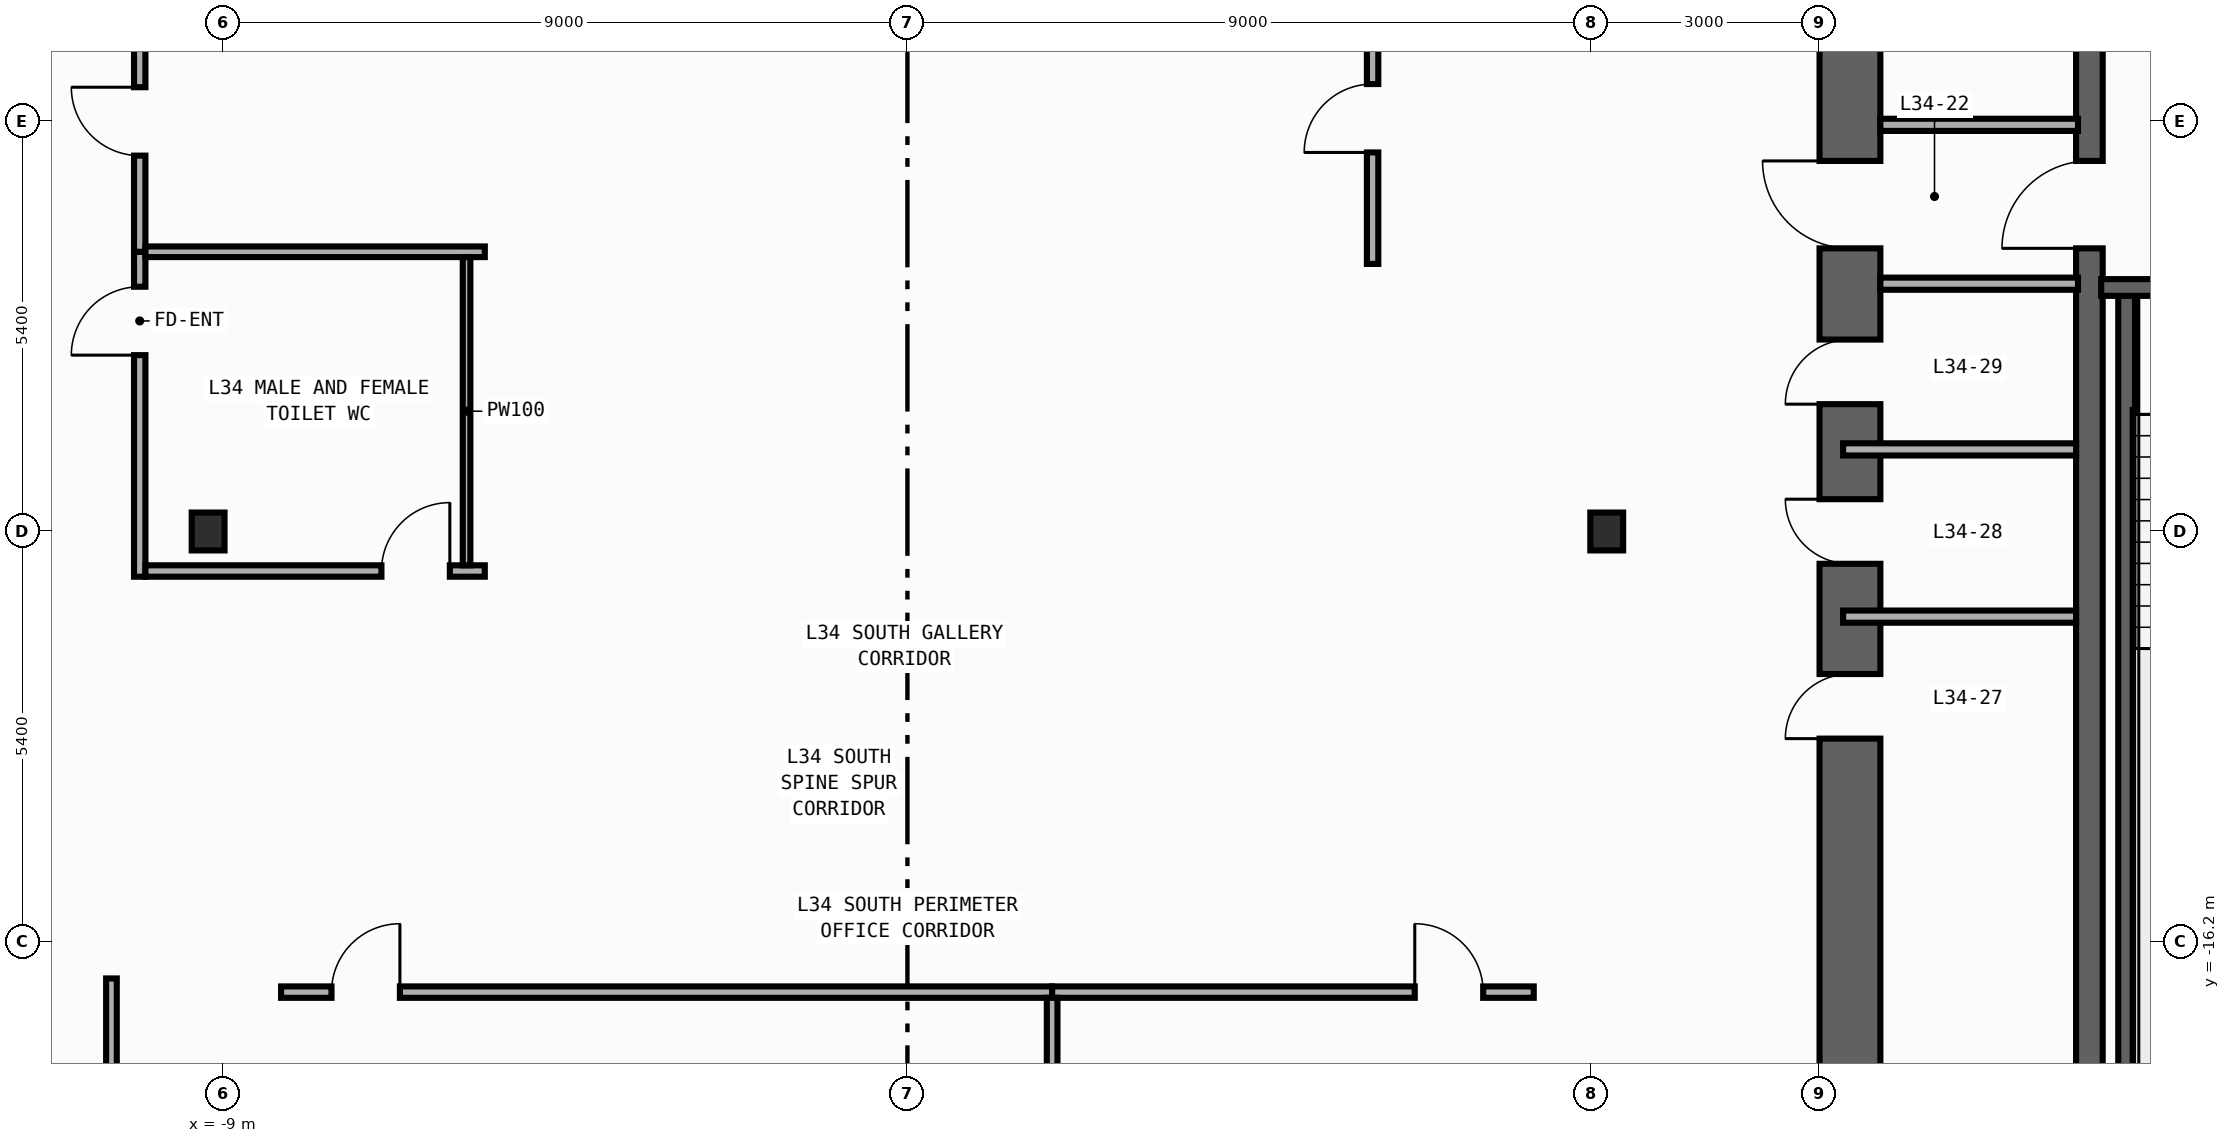
"""IFC4 building model, lengths in metres.
Left out: names, types, materials, properties, quantities, classifications, styles, units other than length and angle.
Written with IfcOpenShell. Run it as: python <this file> out.ifc"""

import sys

from ifc_helpers import new_model, si_unit, direction, frame, frame_2d, origin, origin_2d, place, context, subcontext, project, spatial, rectangle, i_section, extrude, element, fill, save


model = new_model("IFC4")
c1 = context("Model", 3, precision=1e-05, world=origin(), true_north=direction((0.0, 1.0)))
c2 = subcontext(c1, "Body", "Model", "MODEL_VIEW")
j1 = project(units=[si_unit("LENGTHUNIT", "METRE"), si_unit("PLANEANGLEUNIT", "RADIAN")], contexts=[c1])
p1 = place(None, origin())
s1 = spatial("IfcSite", under=j1, at=p1, CompositionType="ELEMENT")
p2 = place(p1, origin())
s2 = spatial("IfcBuilding", under=s1, at=p2, CompositionType="ELEMENT")
p3 = place(p2, frame((0.0, 0.0, 147.8)))
s3 = spatial("IfcBuildingStorey", under=s2, at=p3, CompositionType="ELEMENT", Elevation=147.8)
p4 = place(p3, frame((12.4, -19.8, 0.0), z_axis=(0.0, 0.0, 1.0), x_axis=(0.0, 1.0, 0.0)))
e1 = element("IfcWall", 1, at=p4, inside=s3, PredefinedType="SHEAR", context=c2, shape_type="SweptSolid", body=[
    extrude(rectangle(XDim=27.0, YDim=0.8, at=frame_2d((13.5, 0.0))), origin(), (0.0, 0.0, 1.0), 3.85),
])
p5 = place(p4, frame((23.05, 0.0, 0.0)))
e2 = element("IfcOpeningElement", 2, at=p5, cuts=e1, PredefinedType="OPENING", context=c2, shape_type="SweptSolid", body=[
    extrude(rectangle(XDim=1.1, YDim=2.2, at=frame_2d((0.55, 1.1))), frame((0.0, 0.41, 0.0), z_axis=(0.0, -1.0, 0.0), x_axis=(1.0, 0.0, 0.0)), (0.0, 0.0, 1.0), 0.82),
])
p6 = place(p4, frame((19.85, 0.0, 0.0)))
e3 = element("IfcOpeningElement", 3, at=p6, cuts=e1, PredefinedType="OPENING", context=c2, shape_type="SweptSolid", body=[
    extrude(rectangle(XDim=1.1, YDim=2.2, at=frame_2d((0.55, 1.1))), frame((0.0, 0.41, 0.0), z_axis=(0.0, -1.0, 0.0), x_axis=(1.0, 0.0, 0.0)), (0.0, 0.0, 1.0), 0.82),
])
p7 = place(p4, frame((16.65, 0.0, 0.0)))
e4 = element("IfcOpeningElement", 4, at=p7, cuts=e1, PredefinedType="OPENING", context=c2, shape_type="SweptSolid", body=[
    extrude(rectangle(XDim=1.1, YDim=2.2, at=frame_2d((0.55, 1.1))), frame((0.0, 0.41, 0.0), z_axis=(0.0, -1.0, 0.0), x_axis=(1.0, 0.0, 0.0)), (0.0, 0.0, 1.0), 0.82),
])
p8 = place(p4, frame((6.275, 0.0, 0.0)))
e5 = element("IfcOpeningElement", 5, at=p8, cuts=e1, PredefinedType="OPENING", context=c2, shape_type="SweptSolid", body=[
    extrude(rectangle(XDim=0.85, YDim=2.1, at=frame_2d((0.425, 1.05))), frame((0.0, 0.41, 0.0), z_axis=(0.0, -1.0, 0.0), x_axis=(1.0, 0.0, 0.0)), (0.0, 0.0, 1.0), 0.82),
])
p9 = place(p4, frame((8.575, 0.0, 0.0)))
e6 = element("IfcOpeningElement", 6, at=p9, cuts=e1, PredefinedType="OPENING", context=c2, shape_type="SweptSolid", body=[
    extrude(rectangle(XDim=0.85, YDim=2.1, at=frame_2d((0.425, 1.05))), frame((0.0, 0.41, 0.0), z_axis=(0.0, -1.0, 0.0), x_axis=(1.0, 0.0, 0.0)), (0.0, 0.0, 1.0), 0.82),
])
p10 = place(p4, frame((10.675, 0.0, 0.0)))
e7 = element("IfcOpeningElement", 7, at=p10, cuts=e1, PredefinedType="OPENING", context=c2, shape_type="SweptSolid", body=[
    extrude(rectangle(XDim=0.85, YDim=2.1, at=frame_2d((0.425, 1.05))), frame((0.0, 0.41, 0.0), z_axis=(0.0, -1.0, 0.0), x_axis=(1.0, 0.0, 0.0)), (0.0, 0.0, 1.0), 0.82),
])
p11 = place(p4, frame((12.725, 0.0, 0.0)))
e8 = element("IfcOpeningElement", 8, at=p11, cuts=e1, PredefinedType="OPENING", context=c2, shape_type="SweptSolid", body=[
    extrude(rectangle(XDim=1.15, YDim=2.2, at=frame_2d((0.575, 1.1))), frame((0.0, 0.41, 0.0), z_axis=(0.0, -1.0, 0.0), x_axis=(1.0, 0.0, 0.0)), (0.0, 0.0, 1.0), 0.82),
])
p12 = place(p4, frame((25.125, 0.0, 0.0)))
e9 = element("IfcOpeningElement", 9, at=p12, cuts=e1, PredefinedType="OPENING", context=c2, shape_type="SweptSolid", body=[
    extrude(rectangle(XDim=0.85, YDim=2.1, at=frame_2d((0.425, 1.05))), frame((0.0, 0.41, 0.0), z_axis=(0.0, -1.0, 0.0), x_axis=(1.0, 0.0, 0.0)), (0.0, 0.0, 1.0), 0.82),
])
p13 = place(p3, frame((15.55, -19.0, 0.0), z_axis=(0.0, 0.0, 1.0), x_axis=(0.0, 1.0, 0.0)))
e10 = element("IfcWall", 10, at=p13, inside=s3, PredefinedType="SHEAR", context=c2, shape_type="SweptSolid", body=[
    extrude(rectangle(XDim=25.4, YDim=0.35, at=frame_2d((12.7, 0.0))), origin(), (0.0, 0.0, 1.0), 3.85),
])
p14 = place(p13, frame((11.925, 0.0, 0.0)))
e11 = element("IfcOpeningElement", 11, at=p14, cuts=e10, PredefinedType="OPENING", context=c2, shape_type="SweptSolid", body=[
    extrude(rectangle(XDim=1.15, YDim=2.2, at=frame_2d((0.575, 1.1))), frame((0.0, 0.185, 0.0), z_axis=(0.0, -1.0, 0.0), x_axis=(1.0, 0.0, 0.0)), (0.0, 0.0, 1.0), 0.37),
])
p15 = place(p13, frame((24.325, 0.0, 0.0)))
e12 = element("IfcOpeningElement", 12, at=p15, cuts=e10, PredefinedType="OPENING", context=c2, shape_type="SweptSolid", body=[
    extrude(rectangle(XDim=0.85, YDim=2.1, at=frame_2d((0.425, 1.05))), frame((0.0, 0.185, 0.0), z_axis=(0.0, -1.0, 0.0), x_axis=(1.0, 0.0, 0.0)), (0.0, 0.0, 1.0), 0.37),
])
p16 = place(p3, frame((16.04, -18.89, 0.0), z_axis=(0.0, 0.0, 1.0), x_axis=(0.0, 1.0, 0.0)))
e13 = element("IfcWall", 13, at=p16, inside=s3, PredefinedType="SHEAR", context=c2, shape_type="SweptSolid", body=[
    extrude(rectangle(XDim=11.3, YDim=0.22, at=frame_2d((5.65, 0.0))), origin(), (0.0, 0.0, 1.0), 3.85),
])
p17 = place(p3, frame((19.62, -7.59, 0.0), z_axis=(0.0, 0.0, 1.0), x_axis=(-1.0, 0.0, 0.0)))
e14 = element("IfcWall", 14, at=p17, inside=s3, PredefinedType="SHEAR", context=c2, shape_type="SweptSolid", body=[
    extrude(rectangle(XDim=3.915, YDim=0.22, at=frame_2d((1.958, 0.0))), origin(), (0.0, 0.0, 1.0), 3.85),
])
p18 = place(p17, frame((1.08, 0.0, 0.0)))
e15 = element("IfcOpeningElement", 15, at=p18, cuts=e14, PredefinedType="OPENING", context=c2, shape_type="SweptSolid", body=[
    extrude(rectangle(XDim=1.1, YDim=2.2, at=frame_2d((0.55, 1.1))), frame((0.0, 0.12, 0.0), z_axis=(0.0, -1.0, 0.0), x_axis=(1.0, 0.0, 0.0)), (0.0, 0.0, 1.0), 0.24),
])
for number, where, z_axis, x_axis in (
    (16, (-9.2, -10.8, 0.0), (0.0, 0.0, 1.0), (1.0, 0.0, 0.0)),
    (17, (9.2, -10.8, 0.0), (0.0, 0.0, 1.0), (1.0, 0.0, 0.0)),
):
    element("IfcColumn", number, at=place(p3, frame(where, z_axis=z_axis, x_axis=x_axis)), inside=s3, PredefinedType="COLUMN", context=c2, shape_type="SweptSolid", body=[
        extrude(i_section(OverallWidth=0.432, OverallDepth=0.498, WebThickness=0.045, FlangeThickness=0.07, FilletRadius=0.022, at=origin_2d()), origin(), (0.0, 0.0, 1.0), 4.2),
    ])
for number, where, z_axis, x_axis in (
    (18, (12.8, -5.45, 0.0), (0.0, 0.0, 1.0), (1.0, 0.0, 0.0)),
    (19, (12.8, -7.54, 0.0), (0.0, 0.0, 1.0), (1.0, 0.0, 0.0)),
):
    element("IfcWall", number, at=place(p3, frame(where, z_axis=z_axis, x_axis=x_axis)), inside=s3, PredefinedType="STANDARD", context=c2, shape_type="SweptSolid", body=[
        extrude(rectangle(XDim=2.6, YDim=0.16, at=frame_2d((1.3, 0.0))), origin(), (0.0, 0.0, 1.0), 3.85),
    ])
for number, where, z_axis, x_axis in (
    (20, (12.31, -11.92, 0.0), (0.0, 0.0, 1.0), (1.0, 0.0, 0.0)),
    (21, (12.31, -9.72, 0.0), (0.0, 0.0, 1.0), (1.0, 0.0, 0.0)),
):
    element("IfcWall", number, at=place(p3, frame(where, z_axis=z_axis, x_axis=x_axis)), inside=s3, PredefinedType="PARTITIONING", context=c2, shape_type="SweptSolid", body=[
        extrude(rectangle(XDim=3.065, YDim=0.16, at=frame_2d((1.532, 0.0))), origin(), (0.0, 0.0, 1.0), 3.85),
    ])
p19 = place(p3, frame((-10.1, -11.395, 0.0), z_axis=(0.0, 0.0, 1.0), x_axis=(0.0, 1.0, 0.0)))
e22 = element("IfcWall", 22, at=p19, inside=s3, PredefinedType="PARTITIONING", context=c2, shape_type="SweptSolid", body=[
    extrude(rectangle(XDim=4.275, YDim=0.15, at=frame_2d((2.137, 0.0))), origin(), (0.0, 0.0, 1.0), 3.85),
])
p20 = place(p19, frame((2.915, 0.0, 0.0)))
e23 = element("IfcOpeningElement", 23, at=p20, cuts=e22, PredefinedType="OPENING", context=c2, shape_type="SweptSolid", body=[
    extrude(rectangle(XDim=0.9, YDim=2.15, at=frame_2d((0.45, 1.075))), frame((0.0, 0.085, 0.0), z_axis=(0.0, -1.0, 0.0), x_axis=(1.0, 0.0, 0.0)), (0.0, 0.0, 1.0), 0.17),
])
p21 = place(p3, frame((-10.1, -7.12, 0.0), z_axis=(0.0, 0.0, 1.0), x_axis=(0.0, 1.0, 0.0)))
e24 = element("IfcWall", 24, at=p21, inside=s3, PredefinedType="PARTITIONING", context=c2, shape_type="SweptSolid", body=[
    extrude(rectangle(XDim=17.915, YDim=0.15, at=frame_2d((8.958, 0.0))), origin(), (0.0, 0.0, 1.0), 3.85),
])
p22 = place(p21, frame((1.265, 0.0, 0.0)))
e25 = element("IfcOpeningElement", 25, at=p22, cuts=e24, PredefinedType="OPENING", context=c2, shape_type="SweptSolid", body=[
    extrude(rectangle(XDim=0.9, YDim=2.15, at=frame_2d((0.45, 1.075))), frame((0.0, 0.085, 0.0), z_axis=(0.0, -1.0, 0.0), x_axis=(1.0, 0.0, 0.0)), (0.0, 0.0, 1.0), 0.17),
])
p23 = place(p3, frame((-10.025, -11.32, 0.0), z_axis=(0.0, 0.0, 1.0), x_axis=(1.0, 0.0, 0.0)))
e26 = element("IfcWall", 26, at=p23, inside=s3, PredefinedType="PARTITIONING", context=c2, shape_type="SweptSolid", body=[
    extrude(rectangle(XDim=4.465, YDim=0.15, at=frame_2d((2.232, 0.0))), origin(), (0.0, 0.0, 1.0), 3.85),
])
p24 = place(p23, frame((3.105, 0.0, 0.0)))
e27 = element("IfcOpeningElement", 27, at=p24, cuts=e26, PredefinedType="OPENING", context=c2, shape_type="SweptSolid", body=[
    extrude(rectangle(XDim=0.9, YDim=2.15, at=frame_2d((0.45, 1.075))), frame((0.0, 0.085, 0.0), z_axis=(0.0, -1.0, 0.0), x_axis=(1.0, 0.0, 0.0)), (0.0, 0.0, 1.0), 0.17),
])
p25 = place(p3, frame((6.12, -7.28, 0.0), z_axis=(0.0, 0.0, 1.0), x_axis=(0.0, 1.0, 0.0)))
e28 = element("IfcWall", 28, at=p25, inside=s3, PredefinedType="PARTITIONING", context=c2, shape_type="SweptSolid", body=[
    extrude(rectangle(XDim=17.925, YDim=0.15, at=frame_2d((8.962, 0.0))), origin(), (0.0, 0.0, 1.0), 3.85),
])
p26 = place(p25, frame((1.467, 0.0, 0.0)))
e29 = element("IfcOpeningElement", 29, at=p26, cuts=e28, PredefinedType="OPENING", context=c2, shape_type="SweptSolid", body=[
    extrude(rectangle(XDim=0.9, YDim=2.15, at=frame_2d((0.45, 1.075))), frame((0.0, 0.085, 0.0), z_axis=(0.0, -1.0, 0.0), x_axis=(1.0, 0.0, 0.0)), (0.0, 0.0, 1.0), 0.17),
])
p27 = place(p3, frame((-8.24, -16.86, 0.0), z_axis=(0.0, 0.0, 1.0), x_axis=(1.0, 0.0, 0.0)))
e30 = element("IfcWall", 30, at=p27, inside=s3, PredefinedType="PARTITIONING", context=c2, shape_type="SweptSolid", body=[
    extrude(rectangle(XDim=10.144, YDim=0.15, at=frame_2d((5.072, 0.0))), origin(), (0.0, 0.0, 1.0), 3.85),
])
p28 = place(p27, frame((0.663, 0.0, 0.0)))
e31 = element("IfcOpeningElement", 31, at=p28, cuts=e30, PredefinedType="OPENING", context=c2, shape_type="SweptSolid", body=[
    extrude(rectangle(XDim=0.9, YDim=2.15, at=frame_2d((0.45, 1.075))), frame((0.0, 0.085, 0.0), z_axis=(0.0, -1.0, 0.0), x_axis=(1.0, 0.0, 0.0)), (0.0, 0.0, 1.0), 0.17),
])
p29 = place(p3, frame((1.904, -16.86, 0.0), z_axis=(0.0, 0.0, 1.0), x_axis=(1.0, 0.0, 0.0)))
e32 = element("IfcWall", 32, at=p29, inside=s3, PredefinedType="PARTITIONING", context=c2, shape_type="SweptSolid", body=[
    extrude(rectangle(XDim=6.336, YDim=0.15, at=frame_2d((3.168, 0.0))), origin(), (0.0, 0.0, 1.0), 3.85),
])
p30 = place(p29, frame((4.771, 0.0, 0.0)))
e33 = element("IfcOpeningElement", 33, at=p30, cuts=e32, PredefinedType="OPENING", context=c2, shape_type="SweptSolid", body=[
    extrude(rectangle(XDim=0.9, YDim=2.15, at=frame_2d((0.45, 1.075))), frame((0.0, 0.085, 0.0), z_axis=(0.0, -1.0, 0.0), x_axis=(1.0, 0.0, 0.0)), (0.0, 0.0, 1.0), 0.17),
])
p31 = place(p3, frame((-10.472, -26.118, 0.0), z_axis=(0.0, 0.0, 1.0), x_axis=(0.0, 1.0, 0.0)))
e34 = element("IfcWall", 34, at=p31, inside=s3, PredefinedType="PARTITIONING", context=c2, shape_type="SweptSolid", body=[
    extrude(rectangle(XDim=9.438, YDim=0.14, at=frame_2d((4.719, 0.0))), origin(), (0.0, 0.0, 1.0), 3.85),
])
p32 = place(p31, frame((3.083, 0.0, 0.0)))
e35 = element("IfcOpeningElement", 35, at=p32, cuts=e34, PredefinedType="OPENING", context=c2, shape_type="SweptSolid", body=[
    extrude(rectangle(XDim=0.85, YDim=2.1, at=frame_2d((0.425, 1.05))), frame((0.0, 0.08, 0.0), z_axis=(0.0, -1.0, 0.0), x_axis=(1.0, 0.0, 0.0)), (0.0, 0.0, 1.0), 0.16),
])
p33 = place(p3, frame((1.904, -26.057, 0.0), z_axis=(0.0, 0.0, 1.0), x_axis=(0.0, 1.0, 0.0)))
e36 = element("IfcWall", 36, at=p33, inside=s3, PredefinedType="PARTITIONING", context=c2, shape_type="SweptSolid", body=[
    extrude(rectangle(XDim=9.122, YDim=0.14, at=frame_2d((4.561, 0.0))), origin(), (0.0, 0.0, 1.0), 3.85),
])
p34 = place(p3, frame((-10.025, -7.12, 0.0), z_axis=(0.0, 0.0, 1.0), x_axis=(1.0, 0.0, 0.0)))
e37 = element("IfcWall", 37, at=p34, inside=s3, PredefinedType="PARTITIONING", context=c2, shape_type="SweptSolid", body=[
    extrude(rectangle(XDim=4.465, YDim=0.14, at=frame_2d((2.232, 0.0))), origin(), (0.0, 0.0, 1.0), 3.85),
])
p35 = place(p3, frame((-5.8, -7.19, 0.0), z_axis=(0.0, 0.0, 1.0), x_axis=(0.0, -1.0, 0.0)))
e38 = element("IfcWall", 38, at=p35, inside=s3, PredefinedType="PARTITIONING", context=c2, shape_type="SweptSolid", body=[
    extrude(rectangle(XDim=4.055, YDim=0.1, at=frame_2d((2.028, 0.0))), origin(), (0.0, 0.0, 1.0), 3.85),
])
p36 = place(p8, origin())
e39 = element("IfcDoor", 39, at=p36, inside=s3, OperationType="SINGLE_SWING_LEFT", PredefinedType="DOOR", context=c2, shape_type="SweptSolid", body=[
    extrude(rectangle(XDim=0.85, YDim=2.1, at=frame_2d((0.425, 1.05))), frame((0.0, 0.025, 0.0), z_axis=(0.0, -1.0, 0.0), x_axis=(1.0, 0.0, 0.0)), (0.0, 0.0, 1.0), 0.05),
])
fill(e5, e39)
p37 = place(p9, origin())
e40 = element("IfcDoor", 40, at=p37, inside=s3, OperationType="SINGLE_SWING_RIGHT", PredefinedType="DOOR", context=c2, shape_type="SweptSolid", body=[
    extrude(rectangle(XDim=0.85, YDim=2.1, at=frame_2d((0.425, 1.05))), frame((0.0, 0.025, 0.0), z_axis=(0.0, -1.0, 0.0), x_axis=(1.0, 0.0, 0.0)), (0.0, 0.0, 1.0), 0.05),
])
fill(e6, e40)
p38 = place(p10, origin())
e41 = element("IfcDoor", 41, at=p38, inside=s3, OperationType="SINGLE_SWING_LEFT", PredefinedType="DOOR", context=c2, shape_type="SweptSolid", body=[
    extrude(rectangle(XDim=0.85, YDim=2.1, at=frame_2d((0.425, 1.05))), frame((0.0, 0.025, 0.0), z_axis=(0.0, -1.0, 0.0), x_axis=(1.0, 0.0, 0.0)), (0.0, 0.0, 1.0), 0.05),
])
fill(e7, e41)
p39 = place(p11, origin())
e42 = element("IfcDoor", 42, at=p39, inside=s3, OperationType="SINGLE_SWING_RIGHT", PredefinedType="DOOR", context=c2, shape_type="SweptSolid", body=[
    extrude(rectangle(XDim=1.15, YDim=2.2, at=frame_2d((0.575, 1.1))), frame((0.0, 0.025, 0.0), z_axis=(0.0, -1.0, 0.0), x_axis=(1.0, 0.0, 0.0)), (0.0, 0.0, 1.0), 0.05),
])
fill(e8, e42)
p40 = place(p14, origin())
e43 = element("IfcDoor", 43, at=p40, inside=s3, OperationType="SINGLE_SWING_LEFT", PredefinedType="DOOR", context=c2, shape_type="SweptSolid", body=[
    extrude(rectangle(XDim=1.15, YDim=2.2, at=frame_2d((0.575, 1.1))), frame((0.0, 0.025, 0.0), z_axis=(0.0, -1.0, 0.0), x_axis=(1.0, 0.0, 0.0)), (0.0, 0.0, 1.0), 0.05),
])
fill(e11, e43)
p41 = place(p20, origin())
e44 = element("IfcDoor", 44, at=p41, inside=s3, OperationType="SINGLE_SWING_LEFT", PredefinedType="DOOR", context=c2, shape_type="SweptSolid", body=[
    extrude(rectangle(XDim=0.9, YDim=2.15, at=frame_2d((0.45, 1.075))), frame((0.0, 0.025, 0.0), z_axis=(0.0, -1.0, 0.0), x_axis=(1.0, 0.0, 0.0)), (0.0, 0.0, 1.0), 0.05),
])
fill(e23, e44)
p42 = place(p22, origin())
e45 = element("IfcDoor", 45, at=p42, inside=s3, OperationType="SINGLE_SWING_RIGHT", PredefinedType="DOOR", context=c2, shape_type="SweptSolid", body=[
    extrude(rectangle(XDim=0.9, YDim=2.15, at=frame_2d((0.45, 1.075))), frame((0.0, 0.025, 0.0), z_axis=(0.0, -1.0, 0.0), x_axis=(1.0, 0.0, 0.0)), (0.0, 0.0, 1.0), 0.05),
])
fill(e25, e45)
p43 = place(p24, origin())
e46 = element("IfcDoor", 46, at=p43, inside=s3, OperationType="SINGLE_SWING_RIGHT", PredefinedType="DOOR", context=c2, shape_type="SweptSolid", body=[
    extrude(rectangle(XDim=0.9, YDim=2.15, at=frame_2d((0.45, 1.075))), frame((0.0, 0.025, 0.0), z_axis=(0.0, -1.0, 0.0), x_axis=(1.0, 0.0, 0.0)), (0.0, 0.0, 1.0), 0.05),
])
fill(e27, e46)
p44 = place(p26, origin())
e47 = element("IfcDoor", 47, at=p44, inside=s3, OperationType="SINGLE_SWING_LEFT", PredefinedType="DOOR", context=c2, shape_type="SweptSolid", body=[
    extrude(rectangle(XDim=0.9, YDim=2.15, at=frame_2d((0.45, 1.075))), frame((0.0, 0.025, 0.0), z_axis=(0.0, -1.0, 0.0), x_axis=(1.0, 0.0, 0.0)), (0.0, 0.0, 1.0), 0.05),
])
fill(e29, e47)
p45 = place(p28, origin())
e48 = element("IfcDoor", 48, at=p45, inside=s3, OperationType="SINGLE_SWING_RIGHT", PredefinedType="DOOR", context=c2, shape_type="SweptSolid", body=[
    extrude(rectangle(XDim=0.9, YDim=2.15, at=frame_2d((0.45, 1.075))), frame((0.0, 0.025, 0.0), z_axis=(0.0, -1.0, 0.0), x_axis=(1.0, 0.0, 0.0)), (0.0, 0.0, 1.0), 0.05),
])
fill(e31, e48)
p46 = place(p30, origin())
e49 = element("IfcDoor", 49, at=p46, inside=s3, OperationType="SINGLE_SWING_LEFT", PredefinedType="DOOR", context=c2, shape_type="SweptSolid", body=[
    extrude(rectangle(XDim=0.9, YDim=2.15, at=frame_2d((0.45, 1.075))), frame((0.0, 0.025, 0.0), z_axis=(0.0, -1.0, 0.0), x_axis=(1.0, 0.0, 0.0)), (0.0, 0.0, 1.0), 0.05),
])
fill(e33, e49)
save(model, sys.argv[1])
